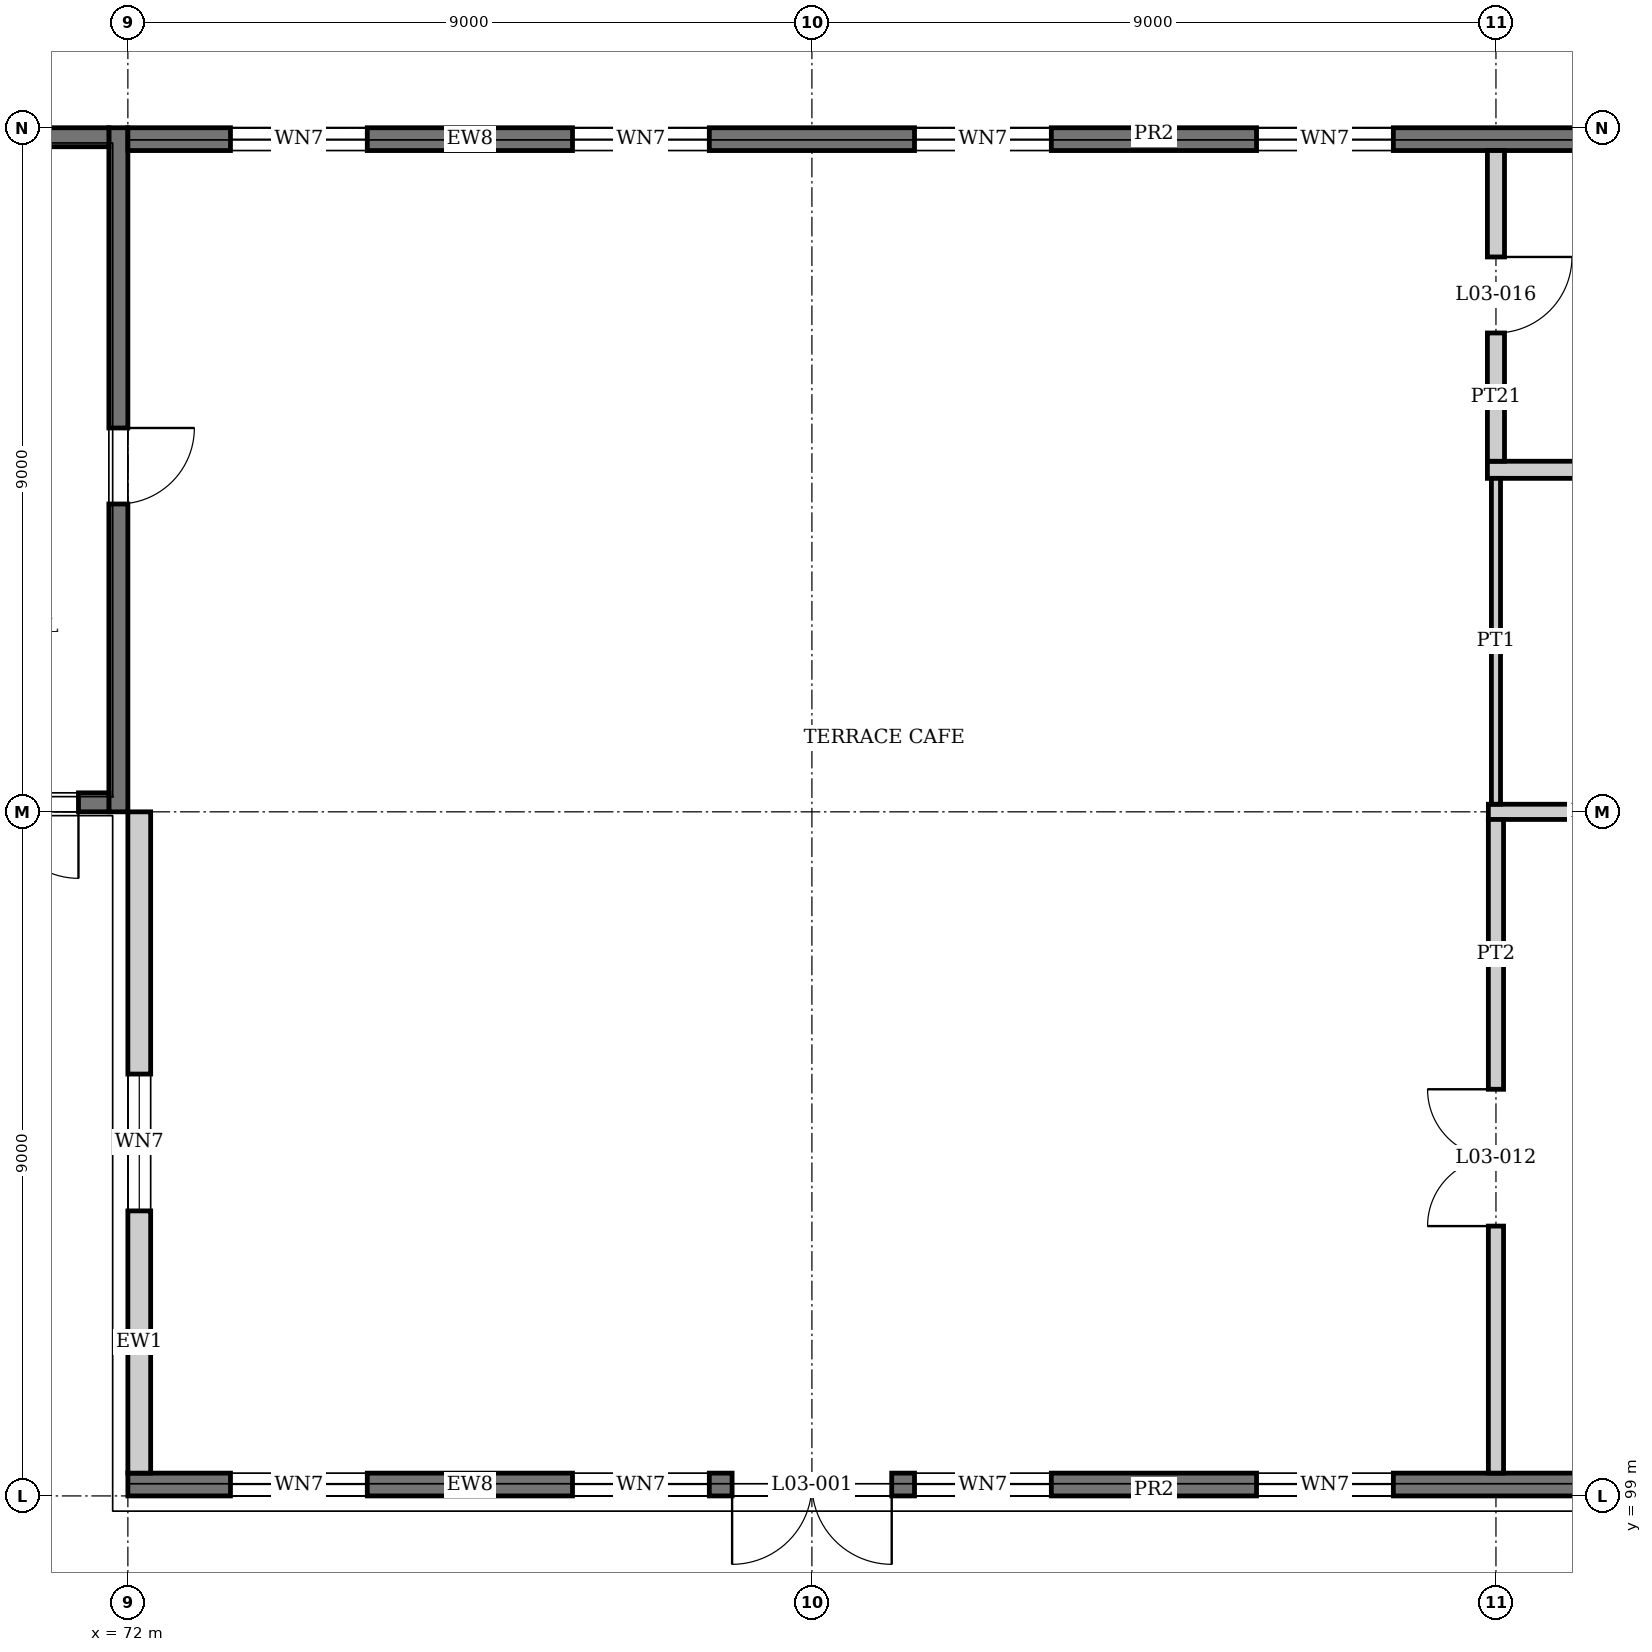
"""IFC4 building model, lengths in metres.
Left out: names, types, materials, properties, quantities, classifications, styles, units other than length and angle.
Written with IfcOpenShell. Run it as: python <this file> out.ifc"""

import sys

from ifc_helpers import new_model, si_unit, direction, frame, frame_2d, origin, place, context, subcontext, project, spatial, rectangle, extrude, element, fill, save


model = new_model("IFC4")
c1 = context("Model", 3, precision=1e-05, world=origin(), true_north=direction((0.0, 1.0)))
c2 = subcontext(c1, "Body", "Model", "MODEL_VIEW")
j1 = project(units=[si_unit("LENGTHUNIT", "METRE"), si_unit("PLANEANGLEUNIT", "RADIAN")], contexts=[c1])
p1 = place(None, origin())
s1 = spatial("IfcSite", under=j1, at=p1, CompositionType="ELEMENT")
p2 = place(p1, origin())
s2 = spatial("IfcBuilding", under=s1, at=p2, CompositionType="ELEMENT")
p3 = place(p2, frame((0.0, 0.0, 15.0)))
s3 = spatial("IfcBuildingStorey", under=s2, at=p3, CompositionType="ELEMENT", Elevation=15.0)
p4 = place(p3, frame((71.875, 108.0, 0.0), z_axis=(0.0, 0.0, 1.0), x_axis=(0.0, 1.0, 0.0)))
e1 = element("IfcWall", 1, at=p4, inside=s3, PredefinedType="SHEAR", context=c2, shape_type="SweptSolid", body=[
    extrude(rectangle(XDim=9.0, YDim=0.25, at=frame_2d((4.5, 0.0))), origin(), (0.0, 0.0, 1.0), 4.05),
])
p5 = place(p4, frame((4.05, 0.0, 0.0)))
e2 = element("IfcOpeningElement", 2, at=p5, cuts=e1, PredefinedType="OPENING", context=c2, shape_type="SweptSolid", body=[
    extrude(rectangle(XDim=1.0, YDim=2.1, at=frame_2d((0.5, 1.05))), frame((0.0, 0.135, 0.0), z_axis=(0.0, -1.0, 0.0), x_axis=(1.0, 0.0, 0.0)), (0.0, 0.0, 1.0), 0.27),
])
p6 = place(p3, frame((63.25, 108.125, 0.0), z_axis=(0.0, 0.0, 1.0), x_axis=(1.0, 0.0, 0.0)))
e3 = element("IfcWall", 3, at=p6, inside=s3, PredefinedType="SHEAR", context=c2, shape_type="SweptSolid", body=[
    extrude(rectangle(XDim=8.5, YDim=0.25, at=frame_2d((4.25, 0.0))), origin(), (0.0, 0.0, 1.0), 4.05),
])
p7 = place(p6, frame((7.1, 0.0, 0.0)))
e4 = element("IfcOpeningElement", 4, at=p7, cuts=e3, PredefinedType="OPENING", context=c2, shape_type="SweptSolid", body=[
    extrude(rectangle(XDim=1.0, YDim=2.1, at=frame_2d((0.5, 1.05))), frame((0.0, 0.135, 0.0), z_axis=(0.0, -1.0, 0.0), x_axis=(1.0, 0.0, 0.0)), (0.0, 0.0, 1.0), 0.27),
])
p8 = place(p3, frame((63.25, 116.875, 0.0), z_axis=(0.0, 0.0, 1.0), x_axis=(1.0, 0.0, 0.0)))
e5 = element("IfcWall", 5, at=p8, inside=s3, PredefinedType="SHEAR", context=c2, shape_type="SweptSolid", body=[
    extrude(rectangle(XDim=8.5, YDim=0.25, at=frame_2d((4.25, 0.0))), origin(), (0.0, 0.0, 1.0), 4.05),
])
p9 = place(p3, frame((72.0, 99.15, 0.0), z_axis=(0.0, 0.0, 1.0), x_axis=(1.0, 0.0, 0.0)))
e6 = element("IfcWall", 6, at=p9, inside=s3, PredefinedType="SOLIDWALL", context=c2, shape_type="SweptSolid", body=[
    extrude(rectangle(XDim=27.0, YDim=0.3, at=frame_2d((13.5, 0.0))), origin(), (0.0, 0.0, 1.0), 3.1),
])
p10 = place(p9, frame((1.35, 0.0, 0.9)))
e7 = element("IfcOpeningElement", 7, at=p10, cuts=e6, PredefinedType="OPENING", context=c2, shape_type="SweptSolid", body=[
    extrude(rectangle(XDim=1.8, YDim=2.1, at=frame_2d((0.9, 1.05))), frame((0.0, 0.16, 0.0), z_axis=(0.0, -1.0, 0.0), x_axis=(1.0, 0.0, 0.0)), (0.0, 0.0, 1.0), 0.32),
])
p11 = place(p9, frame((5.85, 0.0, 0.9)))
e8 = element("IfcOpeningElement", 8, at=p11, cuts=e6, PredefinedType="OPENING", context=c2, shape_type="SweptSolid", body=[
    extrude(rectangle(XDim=1.8, YDim=2.1, at=frame_2d((0.9, 1.05))), frame((0.0, 0.16, 0.0), z_axis=(0.0, -1.0, 0.0), x_axis=(1.0, 0.0, 0.0)), (0.0, 0.0, 1.0), 0.32),
])
p12 = place(p9, frame((10.35, 0.0, 0.9)))
e9 = element("IfcOpeningElement", 9, at=p12, cuts=e6, PredefinedType="OPENING", context=c2, shape_type="SweptSolid", body=[
    extrude(rectangle(XDim=1.8, YDim=2.1, at=frame_2d((0.9, 1.05))), frame((0.0, 0.16, 0.0), z_axis=(0.0, -1.0, 0.0), x_axis=(1.0, 0.0, 0.0)), (0.0, 0.0, 1.0), 0.32),
])
p13 = place(p9, frame((14.85, 0.0, 0.9)))
e10 = element("IfcOpeningElement", 10, at=p13, cuts=e6, PredefinedType="OPENING", context=c2, shape_type="SweptSolid", body=[
    extrude(rectangle(XDim=1.8, YDim=2.1, at=frame_2d((0.9, 1.05))), frame((0.0, 0.16, 0.0), z_axis=(0.0, -1.0, 0.0), x_axis=(1.0, 0.0, 0.0)), (0.0, 0.0, 1.0), 0.32),
])
p14 = place(p9, frame((19.35, 0.0, 0.9)))
e11 = element("IfcOpeningElement", 11, at=p14, cuts=e6, PredefinedType="OPENING", context=c2, shape_type="SweptSolid", body=[
    extrude(rectangle(XDim=1.8, YDim=2.1, at=frame_2d((0.9, 1.05))), frame((0.0, 0.16, 0.0), z_axis=(0.0, -1.0, 0.0), x_axis=(1.0, 0.0, 0.0)), (0.0, 0.0, 1.0), 0.32),
])
p15 = place(p9, frame((23.85, 0.0, 0.9)))
e12 = element("IfcOpeningElement", 12, at=p15, cuts=e6, PredefinedType="OPENING", context=c2, shape_type="SweptSolid", body=[
    extrude(rectangle(XDim=1.8, YDim=2.1, at=frame_2d((0.9, 1.05))), frame((0.0, 0.16, 0.0), z_axis=(0.0, -1.0, 0.0), x_axis=(1.0, 0.0, 0.0)), (0.0, 0.0, 1.0), 0.32),
])
p16 = place(p9, frame((7.95, 0.0, 0.0)))
e13 = element("IfcOpeningElement", 13, at=p16, cuts=e6, PredefinedType="OPENING", context=c2, shape_type="SweptSolid", body=[
    extrude(rectangle(XDim=2.1, YDim=2.4, at=frame_2d((1.05, 1.2))), frame((0.0, 0.16, 0.0), z_axis=(0.0, -1.0, 0.0), x_axis=(1.0, 0.0, 0.0)), (0.0, 0.0, 1.0), 0.32),
])
p17 = place(p9, frame((21.45, 0.0, 0.0)))
e14 = element("IfcOpeningElement", 14, at=p17, cuts=e6, PredefinedType="OPENING", context=c2, shape_type="SweptSolid", body=[
    extrude(rectangle(XDim=2.1, YDim=2.4, at=frame_2d((1.05, 1.2))), frame((0.0, 0.16, 0.0), z_axis=(0.0, -1.0, 0.0), x_axis=(1.0, 0.0, 0.0)), (0.0, 0.0, 1.0), 0.32),
])
p18 = place(p3, frame((72.0, 116.85, 0.0), z_axis=(0.0, 0.0, 1.0), x_axis=(1.0, 0.0, 0.0)))
e15 = element("IfcWall", 15, at=p18, inside=s3, PredefinedType="SOLIDWALL", context=c2, shape_type="SweptSolid", body=[
    extrude(rectangle(XDim=27.0, YDim=0.3, at=frame_2d((13.5, 0.0))), origin(), (0.0, 0.0, 1.0), 3.1),
])
p19 = place(p18, frame((1.35, 0.0, 0.9)))
e16 = element("IfcOpeningElement", 16, at=p19, cuts=e15, PredefinedType="OPENING", context=c2, shape_type="SweptSolid", body=[
    extrude(rectangle(XDim=1.8, YDim=2.1, at=frame_2d((0.9, 1.05))), frame((0.0, 0.16, 0.0), z_axis=(0.0, -1.0, 0.0), x_axis=(1.0, 0.0, 0.0)), (0.0, 0.0, 1.0), 0.32),
])
p20 = place(p18, frame((5.85, 0.0, 0.9)))
e17 = element("IfcOpeningElement", 17, at=p20, cuts=e15, PredefinedType="OPENING", context=c2, shape_type="SweptSolid", body=[
    extrude(rectangle(XDim=1.8, YDim=2.1, at=frame_2d((0.9, 1.05))), frame((0.0, 0.16, 0.0), z_axis=(0.0, -1.0, 0.0), x_axis=(1.0, 0.0, 0.0)), (0.0, 0.0, 1.0), 0.32),
])
p21 = place(p18, frame((10.35, 0.0, 0.9)))
e18 = element("IfcOpeningElement", 18, at=p21, cuts=e15, PredefinedType="OPENING", context=c2, shape_type="SweptSolid", body=[
    extrude(rectangle(XDim=1.8, YDim=2.1, at=frame_2d((0.9, 1.05))), frame((0.0, 0.16, 0.0), z_axis=(0.0, -1.0, 0.0), x_axis=(1.0, 0.0, 0.0)), (0.0, 0.0, 1.0), 0.32),
])
p22 = place(p18, frame((14.85, 0.0, 0.9)))
e19 = element("IfcOpeningElement", 19, at=p22, cuts=e15, PredefinedType="OPENING", context=c2, shape_type="SweptSolid", body=[
    extrude(rectangle(XDim=1.8, YDim=2.1, at=frame_2d((0.9, 1.05))), frame((0.0, 0.16, 0.0), z_axis=(0.0, -1.0, 0.0), x_axis=(1.0, 0.0, 0.0)), (0.0, 0.0, 1.0), 0.32),
])
p23 = place(p18, frame((19.35, 0.0, 0.9)))
e20 = element("IfcOpeningElement", 20, at=p23, cuts=e15, PredefinedType="OPENING", context=c2, shape_type="SweptSolid", body=[
    extrude(rectangle(XDim=1.8, YDim=2.1, at=frame_2d((0.9, 1.05))), frame((0.0, 0.16, 0.0), z_axis=(0.0, -1.0, 0.0), x_axis=(1.0, 0.0, 0.0)), (0.0, 0.0, 1.0), 0.32),
])
p24 = place(p18, frame((23.85, 0.0, 0.9)))
e21 = element("IfcOpeningElement", 21, at=p24, cuts=e15, PredefinedType="OPENING", context=c2, shape_type="SweptSolid", body=[
    extrude(rectangle(XDim=1.8, YDim=2.1, at=frame_2d((0.9, 1.05))), frame((0.0, 0.16, 0.0), z_axis=(0.0, -1.0, 0.0), x_axis=(1.0, 0.0, 0.0)), (0.0, 0.0, 1.0), 0.32),
])
p25 = place(p3, frame((72.15, 99.3, 0.0), z_axis=(0.0, 0.0, 1.0), x_axis=(0.0, 1.0, 0.0)))
e22 = element("IfcWall", 22, at=p25, inside=s3, PredefinedType="SOLIDWALL", context=c2, shape_type="SweptSolid", body=[
    extrude(rectangle(XDim=8.7, YDim=0.3, at=frame_2d((4.35, 0.0))), origin(), (0.0, 0.0, 1.0), 3.1),
])
p26 = place(p25, frame((3.45, 0.0, 0.9)))
e23 = element("IfcOpeningElement", 23, at=p26, cuts=e22, PredefinedType="OPENING", context=c2, shape_type="SweptSolid", body=[
    extrude(rectangle(XDim=1.8, YDim=2.1, at=frame_2d((0.9, 1.05))), frame((0.0, 0.16, 0.0), z_axis=(0.0, -1.0, 0.0), x_axis=(1.0, 0.0, 0.0)), (0.0, 0.0, 1.0), 0.32),
])
for number, where, z_axis, x_axis in (
    (24, (72.0, 99.08, 3.942), (0.0, 0.0, 1.0), (1.0, 0.0, 0.0)),
    (25, (72.0, 116.92, 3.942), (0.0, 0.0, 1.0), (1.0, 0.0, 0.0)),
):
    element("IfcWall", number, at=place(p3, frame(where, z_axis=z_axis, x_axis=x_axis)), inside=s3, PredefinedType="PARAPET", context=c2, shape_type="SweptSolid", body=[
        extrude(rectangle(XDim=27.0, YDim=0.16, at=frame_2d((13.5, 0.0))), origin(), (0.0, 0.0, 1.0), 1.14),
    ])
p27 = place(p3, frame((89.9, 108.0, 0.0), z_axis=(0.0, 0.0, 1.0), x_axis=(1.0, 0.0, 0.0)))
e26 = element("IfcWall", 26, at=p27, inside=s3, PredefinedType="PARTITIONING", context=c2, shape_type="SweptSolid", body=[
    extrude(rectangle(XDim=8.8, YDim=0.2, at=frame_2d((4.4, 0.0))), origin(), (0.0, 0.0, 1.0), 3.1),
])
p28 = place(p27, frame((1.15, 0.0, 0.0)))
e27 = element("IfcOpeningElement", 27, at=p28, cuts=e26, PredefinedType="OPENING", context=c2, shape_type="SweptSolid", body=[
    extrude(rectangle(XDim=0.92, YDim=2.1, at=frame_2d((0.46, 1.05))), frame((0.0, 0.11, 0.0), z_axis=(0.0, -1.0, 0.0), x_axis=(1.0, 0.0, 0.0)), (0.0, 0.0, 1.0), 0.22),
])
p29 = place(p27, frame((4.15, 0.0, 0.0)))
e28 = element("IfcOpeningElement", 28, at=p29, cuts=e26, PredefinedType="OPENING", context=c2, shape_type="SweptSolid", body=[
    extrude(rectangle(XDim=0.92, YDim=2.1, at=frame_2d((0.46, 1.05))), frame((0.0, 0.11, 0.0), z_axis=(0.0, -1.0, 0.0), x_axis=(1.0, 0.0, 0.0)), (0.0, 0.0, 1.0), 0.22),
])
p30 = place(p27, frame((6.9, 0.0, 0.0)))
e29 = element("IfcOpeningElement", 29, at=p30, cuts=e26, PredefinedType="OPENING", context=c2, shape_type="SweptSolid", body=[
    extrude(rectangle(XDim=1.2, YDim=2.1, at=frame_2d((0.6, 1.05))), frame((0.0, 0.11, 0.0), z_axis=(0.0, -1.0, 0.0), x_axis=(1.0, 0.0, 0.0)), (0.0, 0.0, 1.0), 0.22),
])
p31 = place(p3, frame((89.887, 112.5, 0.0), z_axis=(0.0, 0.0, 1.0), x_axis=(1.0, 0.0, 0.0)))
e30 = element("IfcWall", 30, at=p31, inside=s3, PredefinedType="PARTITIONING", context=c2, shape_type="SweptSolid", body=[
    extrude(rectangle(XDim=4.5, YDim=0.225, at=frame_2d((2.25, 0.0))), origin(), (0.0, 0.0, 1.0), 3.1),
])
p32 = place(p3, frame((90.0, 99.3, 0.0), z_axis=(0.0, 0.0, 1.0), x_axis=(0.0, 1.0, 0.0)))
e31 = element("IfcWall", 31, at=p32, inside=s3, PredefinedType="PARTITIONING", context=c2, shape_type="SweptSolid", body=[
    extrude(rectangle(XDim=8.6, YDim=0.2, at=frame_2d((4.3, 0.0))), origin(), (0.0, 0.0, 1.0), 3.1),
])
p33 = place(p32, frame((3.25, 0.0, 0.0)))
e32 = element("IfcOpeningElement", 32, at=p33, cuts=e31, PredefinedType="OPENING", context=c2, shape_type="SweptSolid", body=[
    extrude(rectangle(XDim=1.8, YDim=2.1, at=frame_2d((0.9, 1.05))), frame((0.0, 0.11, 0.0), z_axis=(0.0, -1.0, 0.0), x_axis=(1.0, 0.0, 0.0)), (0.0, 0.0, 1.0), 0.22),
])
p34 = place(p3, frame((90.0, 108.1, 0.0), z_axis=(0.0, 0.0, 1.0), x_axis=(0.0, 1.0, 0.0)))
e33 = element("IfcWall", 33, at=p34, inside=s3, PredefinedType="PARTITIONING", context=c2, shape_type="SweptSolid", body=[
    extrude(rectangle(XDim=4.287, YDim=0.12, at=frame_2d((2.144, 0.0))), origin(), (0.0, 0.0, 1.0), 3.1),
])
p35 = place(p3, frame((90.0, 112.613, 0.0), z_axis=(0.0, 0.0, 1.0), x_axis=(0.0, 1.0, 0.0)))
e34 = element("IfcWall", 34, at=p35, inside=s3, PredefinedType="PARTITIONING", context=c2, shape_type="SweptSolid", body=[
    extrude(rectangle(XDim=4.087, YDim=0.225, at=frame_2d((2.044, 0.0))), origin(), (0.0, 0.0, 1.0), 3.1),
])
p36 = place(p35, frame((1.688, 0.0, 0.0)))
e35 = element("IfcOpeningElement", 35, at=p36, cuts=e34, PredefinedType="OPENING", context=c2, shape_type="SweptSolid", body=[
    extrude(rectangle(XDim=1.0, YDim=2.1, at=frame_2d((0.5, 1.05))), frame((0.0, 0.123, 0.0), z_axis=(0.0, -1.0, 0.0), x_axis=(1.0, 0.0, 0.0)), (0.0, 0.0, 1.0), 0.245),
])
p37 = place(p10, origin())
e36 = element("IfcWindow", 36, at=p37, inside=s3, PartitioningType="SINGLE_PANEL", PredefinedType="WINDOW", context=c2, shape_type="SweptSolid", body=[
    extrude(rectangle(XDim=1.8, YDim=2.1, at=frame_2d((0.9, 1.05))), frame((0.0, 0.03, 0.0), z_axis=(0.0, -1.0, 0.0), x_axis=(1.0, 0.0, 0.0)), (0.0, 0.0, 1.0), 0.06),
])
fill(e7, e36)
p38 = place(p11, origin())
e37 = element("IfcWindow", 37, at=p38, inside=s3, PartitioningType="SINGLE_PANEL", PredefinedType="WINDOW", context=c2, shape_type="SweptSolid", body=[
    extrude(rectangle(XDim=1.8, YDim=2.1, at=frame_2d((0.9, 1.05))), frame((0.0, 0.03, 0.0), z_axis=(0.0, -1.0, 0.0), x_axis=(1.0, 0.0, 0.0)), (0.0, 0.0, 1.0), 0.06),
])
fill(e8, e37)
p39 = place(p12, origin())
e38 = element("IfcWindow", 38, at=p39, inside=s3, PartitioningType="SINGLE_PANEL", PredefinedType="WINDOW", context=c2, shape_type="SweptSolid", body=[
    extrude(rectangle(XDim=1.8, YDim=2.1, at=frame_2d((0.9, 1.05))), frame((0.0, 0.03, 0.0), z_axis=(0.0, -1.0, 0.0), x_axis=(1.0, 0.0, 0.0)), (0.0, 0.0, 1.0), 0.06),
])
fill(e9, e38)
p40 = place(p13, origin())
e39 = element("IfcWindow", 39, at=p40, inside=s3, PartitioningType="SINGLE_PANEL", PredefinedType="WINDOW", context=c2, shape_type="SweptSolid", body=[
    extrude(rectangle(XDim=1.8, YDim=2.1, at=frame_2d((0.9, 1.05))), frame((0.0, 0.03, 0.0), z_axis=(0.0, -1.0, 0.0), x_axis=(1.0, 0.0, 0.0)), (0.0, 0.0, 1.0), 0.06),
])
fill(e10, e39)
p41 = place(p19, origin())
e40 = element("IfcWindow", 40, at=p41, inside=s3, PartitioningType="SINGLE_PANEL", PredefinedType="WINDOW", context=c2, shape_type="SweptSolid", body=[
    extrude(rectangle(XDim=1.8, YDim=2.1, at=frame_2d((0.9, 1.05))), frame((0.0, 0.03, 0.0), z_axis=(0.0, -1.0, 0.0), x_axis=(1.0, 0.0, 0.0)), (0.0, 0.0, 1.0), 0.06),
])
fill(e16, e40)
p42 = place(p20, origin())
e41 = element("IfcWindow", 41, at=p42, inside=s3, PartitioningType="SINGLE_PANEL", PredefinedType="WINDOW", context=c2, shape_type="SweptSolid", body=[
    extrude(rectangle(XDim=1.8, YDim=2.1, at=frame_2d((0.9, 1.05))), frame((0.0, 0.03, 0.0), z_axis=(0.0, -1.0, 0.0), x_axis=(1.0, 0.0, 0.0)), (0.0, 0.0, 1.0), 0.06),
])
fill(e17, e41)
p43 = place(p21, origin())
e42 = element("IfcWindow", 42, at=p43, inside=s3, PartitioningType="SINGLE_PANEL", PredefinedType="WINDOW", context=c2, shape_type="SweptSolid", body=[
    extrude(rectangle(XDim=1.8, YDim=2.1, at=frame_2d((0.9, 1.05))), frame((0.0, 0.03, 0.0), z_axis=(0.0, -1.0, 0.0), x_axis=(1.0, 0.0, 0.0)), (0.0, 0.0, 1.0), 0.06),
])
fill(e18, e42)
p44 = place(p22, origin())
e43 = element("IfcWindow", 43, at=p44, inside=s3, PartitioningType="SINGLE_PANEL", PredefinedType="WINDOW", context=c2, shape_type="SweptSolid", body=[
    extrude(rectangle(XDim=1.8, YDim=2.1, at=frame_2d((0.9, 1.05))), frame((0.0, 0.03, 0.0), z_axis=(0.0, -1.0, 0.0), x_axis=(1.0, 0.0, 0.0)), (0.0, 0.0, 1.0), 0.06),
])
fill(e19, e43)
p45 = place(p26, origin())
e44 = element("IfcWindow", 44, at=p45, inside=s3, PartitioningType="SINGLE_PANEL", PredefinedType="WINDOW", context=c2, shape_type="SweptSolid", body=[
    extrude(rectangle(XDim=1.8, YDim=2.1, at=frame_2d((0.9, 1.05))), frame((0.0, 0.03, 0.0), z_axis=(0.0, -1.0, 0.0), x_axis=(1.0, 0.0, 0.0)), (0.0, 0.0, 1.0), 0.06),
])
fill(e23, e44)
p46 = place(p16, frame((2.1, 0.0, 0.0), z_axis=(0.0, 0.0, 1.0), x_axis=(-1.0, 0.0, 0.0)))
e45 = element("IfcDoor", 45, at=p46, inside=s3, OperationType="DOUBLE_DOOR_SINGLE_SWING", PredefinedType="DOOR", context=c2, shape_type="SweptSolid", body=[
    extrude(rectangle(XDim=2.1, YDim=2.4, at=frame_2d((1.05, 1.2))), frame((0.0, 0.025, 0.0), z_axis=(0.0, -1.0, 0.0), x_axis=(1.0, 0.0, 0.0)), (0.0, 0.0, 1.0), 0.05),
])
fill(e13, e45)
p47 = place(p7, frame((1.0, 0.0, 0.0), z_axis=(0.0, 0.0, 1.0), x_axis=(-1.0, 0.0, 0.0)))
e46 = element("IfcDoor", 46, at=p47, inside=s3, OperationType="SINGLE_SWING_LEFT", PredefinedType="DOOR", context=c2, shape_type="SweptSolid", body=[
    extrude(rectangle(XDim=1.0, YDim=2.1, at=frame_2d((0.5, 1.05))), frame((0.0, 0.025, 0.0), z_axis=(0.0, -1.0, 0.0), x_axis=(1.0, 0.0, 0.0)), (0.0, 0.0, 1.0), 0.05),
])
fill(e4, e46)
p48 = place(p5, frame((1.0, 0.0, 0.0), z_axis=(0.0, 0.0, 1.0), x_axis=(-1.0, 0.0, 0.0)))
e47 = element("IfcDoor", 47, at=p48, inside=s3, OperationType="SINGLE_SWING_LEFT", PredefinedType="DOOR", context=c2, shape_type="SweptSolid", body=[
    extrude(rectangle(XDim=1.0, YDim=2.1, at=frame_2d((0.5, 1.05))), frame((0.0, 0.025, 0.0), z_axis=(0.0, -1.0, 0.0), x_axis=(1.0, 0.0, 0.0)), (0.0, 0.0, 1.0), 0.05),
])
fill(e2, e47)
p49 = place(p33, origin())
e48 = element("IfcDoor", 48, at=p49, inside=s3, OperationType="DOUBLE_DOOR_SINGLE_SWING", PredefinedType="DOOR", context=c2, shape_type="SweptSolid", body=[
    extrude(rectangle(XDim=1.8, YDim=2.1, at=frame_2d((0.9, 1.05))), frame((0.0, 0.025, 0.0), z_axis=(0.0, -1.0, 0.0), x_axis=(1.0, 0.0, 0.0)), (0.0, 0.0, 1.0), 0.05),
])
fill(e32, e48)
p50 = place(p36, frame((1.0, 0.0, 0.0), z_axis=(0.0, 0.0, 1.0), x_axis=(-1.0, 0.0, 0.0)))
e49 = element("IfcDoor", 49, at=p50, inside=s3, OperationType="SINGLE_SWING_LEFT", PredefinedType="DOOR", context=c2, shape_type="SweptSolid", body=[
    extrude(rectangle(XDim=1.0, YDim=2.1, at=frame_2d((0.5, 1.05))), frame((0.0, 0.025, 0.0), z_axis=(0.0, -1.0, 0.0), x_axis=(1.0, 0.0, 0.0)), (0.0, 0.0, 1.0), 0.05),
])
fill(e35, e49)
save(model, sys.argv[1])
